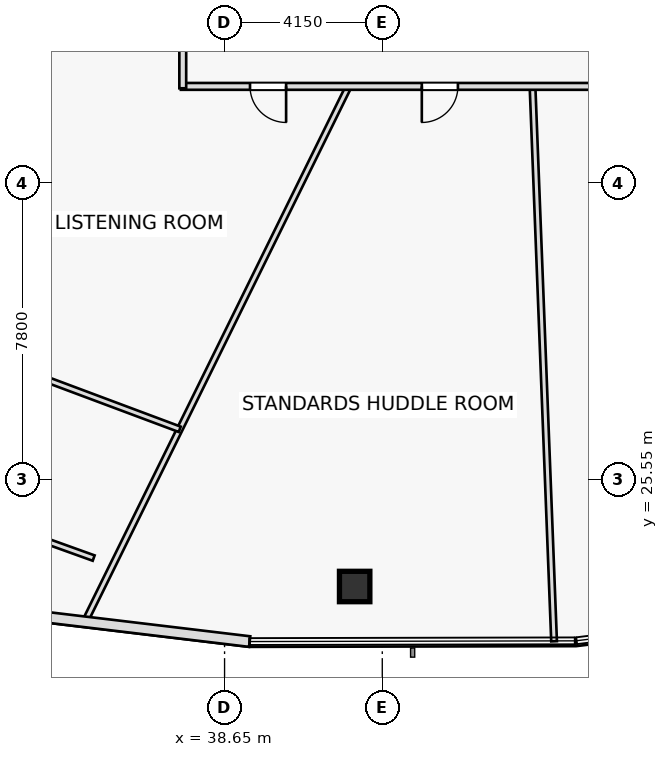
"""IFC4 building model, lengths in metres.
Left out: names, types, materials, properties, quantities, classifications, styles, units other than length and angle.
Written with IfcOpenShell. Run it as: python <this file> out.ifc"""

import sys

from ifc_helpers import new_model, si_unit, direction, frame, frame_2d, origin, origin_2d, place, context, subcontext, project, spatial, rectangle, hollow_rectangle, extrude, element, fill, save


model = new_model("IFC4")
c1 = context("Model", 3, precision=1e-05, world=origin(), true_north=direction((0.0, 1.0)))
c2 = subcontext(c1, "Body", "Model", "MODEL_VIEW")
j1 = project(units=[si_unit("LENGTHUNIT", "METRE"), si_unit("PLANEANGLEUNIT", "RADIAN")], contexts=[c1])
p1 = place(None, origin())
s1 = spatial("IfcSite", under=j1, at=p1, CompositionType="ELEMENT")
p2 = place(p1, origin())
s2 = spatial("IfcBuilding", under=s1, at=p2, CompositionType="ELEMENT")
p3 = place(p2, frame((0.0, 0.0, 39.3)))
s3 = spatial("IfcBuildingStorey", under=s2, at=p3, CompositionType="ELEMENT", Elevation=39.3)
p4 = place(p3, frame((42.073, 22.74, 0.0), z_axis=(0.0, 0.0, 1.0), x_axis=(1.0, 0.0, 0.0)))
e1 = element("IfcColumn", 1, at=p4, inside=s3, PredefinedType="COLUMN", context=c2, shape_type="SweptSolid", body=[
    extrude(hollow_rectangle(XDim=0.8, YDim=0.8, WallThickness=0.045, at=origin_2d()), origin(), (0.0, 0.0, 1.0), 3.6),
])
p5 = place(p3, frame((22.802, 27.945, 0.0), z_axis=(0.0, 0.0, 1.0), x_axis=(0.941102349209, -0.338121824662, 0.0)))
e2 = element("IfcWall", 2, at=p5, inside=s3, PredefinedType="PARTITIONING", context=c2, shape_type="SweptSolid", body=[
    extrude(rectangle(XDim=13.18, YDim=0.15, at=frame_2d((6.59, 0.0))), origin(), (0.0, 0.0, 1.0), 2.925),
])
p6 = place(p3, frame((37.55, 39.238, 0.0), z_axis=(0.0, 0.0, 1.0), x_axis=(-0.838030442993, -0.545623475134, 0.0)))
e3 = element("IfcWall", 3, at=p6, inside=s3, PredefinedType="PARTITIONING", context=c2, shape_type="SweptSolid", body=[
    extrude(rectangle(XDim=22.545, YDim=0.15, at=frame_2d((11.272, 0.0))), origin(), (0.0, 0.0, 1.0), 2.925),
])
p7 = place(p3, frame((41.916, 35.9, 0.0), z_axis=(0.0, 0.0, 1.0), x_axis=(-0.442005604852, -0.897012288255, 0.0)))
e4 = element("IfcWall", 4, at=p7, inside=s3, PredefinedType="PARTITIONING", context=c2, shape_type="SweptSolid", body=[
    extrude(rectangle(XDim=15.718, YDim=0.15, at=frame_2d((7.859, 0.0))), origin(), (0.0, 0.0, 1.0), 2.975),
])
p8 = place(p3, frame((46.753, 35.9, 0.0), z_axis=(0.0, 0.0, 1.0), x_axis=(0.038830968233, -0.999245793539, 0.0)))
e5 = element("IfcWall", 5, at=p8, inside=s3, PredefinedType="PARTITIONING", context=c2, shape_type="SweptSolid", body=[
    extrude(rectangle(XDim=14.612, YDim=0.15, at=frame_2d((7.306, 0.0))), origin(), (0.0, 0.0, 1.0), 2.925),
])
p9 = place(p3, frame((25.458, 31.365, 0.0), z_axis=(0.0, 0.0, 1.0), x_axis=(0.936733084101, -0.350044467391, 0.0)))
e6 = element("IfcWall", 6, at=p9, inside=s3, PredefinedType="PARTITIONING", context=c2, shape_type="SweptSolid", body=[
    extrude(rectangle(XDim=12.823, YDim=0.15, at=frame_2d((6.411, 0.0))), origin(), (0.0, 0.0, 1.0), 2.925),
])
p10 = place(p9, frame((5.936, 0.0, 0.0)))
e7 = element("IfcOpeningElement", 7, at=p10, cuts=e6, PredefinedType="OPENING", context=c2, shape_type="SweptSolid", body=[
    extrude(rectangle(XDim=0.95, YDim=2.05, at=frame_2d((0.475, 1.025))), frame((0.0, 0.085, 0.0), z_axis=(0.0, -1.0, 0.0), x_axis=(1.0, 0.0, 0.0)), (0.0, 0.0, 1.0), 0.17),
])
p11 = place(p3, frame((59.55, 35.9, 0.0), z_axis=(0.0, 0.0, 1.0), x_axis=(-1.0, 0.0, 0.0)))
e8 = element("IfcWall", 8, at=p11, inside=s3, PredefinedType="PARTITIONING", context=c2, shape_type="SweptSolid", body=[
    extrude(rectangle(XDim=22.05, YDim=0.18, at=frame_2d((11.025, 0.0))), origin(), (0.0, 0.0, 1.0), 2.925),
])
p12 = place(p11, frame((2.193, 0.0, 0.0)))
e9 = element("IfcOpeningElement", 9, at=p12, cuts=e8, PredefinedType="OPENING", context=c2, shape_type="SweptSolid", body=[
    extrude(rectangle(XDim=0.95, YDim=2.05, at=frame_2d((0.475, 1.025))), frame((0.0, 0.1, 0.0), z_axis=(0.0, -1.0, 0.0), x_axis=(1.0, 0.0, 0.0)), (0.0, 0.0, 1.0), 0.2),
])
p13 = place(p11, frame((8.49, 0.0, 0.0)))
e10 = element("IfcOpeningElement", 10, at=p13, cuts=e8, PredefinedType="OPENING", context=c2, shape_type="SweptSolid", body=[
    extrude(rectangle(XDim=0.95, YDim=2.05, at=frame_2d((0.475, 1.025))), frame((0.0, 0.1, 0.0), z_axis=(0.0, -1.0, 0.0), x_axis=(1.0, 0.0, 0.0)), (0.0, 0.0, 1.0), 0.2),
])
p14 = place(p11, frame((14.76, 0.0, 0.0)))
e11 = element("IfcOpeningElement", 11, at=p14, cuts=e8, PredefinedType="OPENING", context=c2, shape_type="SweptSolid", body=[
    extrude(rectangle(XDim=0.95, YDim=2.05, at=frame_2d((0.475, 1.025))), frame((0.0, 0.1, 0.0), z_axis=(0.0, -1.0, 0.0), x_axis=(1.0, 0.0, 0.0)), (0.0, 0.0, 1.0), 0.2),
])
p15 = place(p11, frame((19.281, 0.0, 0.0)))
e12 = element("IfcOpeningElement", 12, at=p15, cuts=e8, PredefinedType="OPENING", context=c2, shape_type="SweptSolid", body=[
    extrude(rectangle(XDim=0.95, YDim=2.05, at=frame_2d((0.475, 1.025))), frame((0.0, 0.1, 0.0), z_axis=(0.0, -1.0, 0.0), x_axis=(1.0, 0.0, 0.0)), (0.0, 0.0, 1.0), 0.2),
])
p16 = place(p3, frame((37.55, 35.85, 0.0), z_axis=(0.0, 0.0, 1.0), x_axis=(0.0, 1.0, 0.0)))
e13 = element("IfcWall", 13, at=p16, inside=s3, PredefinedType="PARTITIONING", context=c2, shape_type="SweptSolid", body=[
    extrude(rectangle(XDim=12.65, YDim=0.18, at=frame_2d((6.325, 0.0))), origin(), (0.0, 0.0, 1.0), 2.925),
])
p17 = place(p16, frame((6.159, 0.0, 0.0)))
e14 = element("IfcOpeningElement", 14, at=p17, cuts=e13, PredefinedType="OPENING", context=c2, shape_type="SweptSolid", body=[
    extrude(rectangle(XDim=0.95, YDim=2.05, at=frame_2d((0.475, 1.025))), frame((0.0, 0.1, 0.0), z_axis=(0.0, -1.0, 0.0), x_axis=(1.0, 0.0, 0.0)), (0.0, 0.0, 1.0), 0.2),
])
p18 = place(p3, frame((30.768, 22.314, 0.0), z_axis=(0.0, 0.0, 1.0), x_axis=(0.992909698215, -0.118871069615, 0.0)))
e15 = element("IfcWall", 15, at=p18, inside=s3, PredefinedType="STANDARD", context=c2, shape_type="SweptSolid", body=[
    extrude(rectangle(XDim=8.604, YDim=0.28, at=frame_2d((4.302, 0.0))), origin(), (0.0, 0.0, 1.0), 3.6),
])
p19 = place(p14, origin())
e16 = element("IfcDoor", 16, at=p19, inside=s3, OperationType="SINGLE_SWING_RIGHT", PredefinedType="DOOR", context=c2, shape_type="SweptSolid", body=[
    extrude(rectangle(XDim=0.95, YDim=2.05, at=frame_2d((0.475, 1.025))), frame((0.0, 0.025, 0.0), z_axis=(0.0, -1.0, 0.0), x_axis=(1.0, 0.0, 0.0)), (0.0, 0.0, 1.0), 0.05),
])
fill(e11, e16)
p20 = place(p15, origin())
e17 = element("IfcDoor", 17, at=p20, inside=s3, OperationType="SINGLE_SWING_LEFT", PredefinedType="DOOR", context=c2, shape_type="SweptSolid", body=[
    extrude(rectangle(XDim=0.95, YDim=2.05, at=frame_2d((0.475, 1.025))), frame((0.0, 0.025, 0.0), z_axis=(0.0, -1.0, 0.0), x_axis=(1.0, 0.0, 0.0)), (0.0, 0.0, 1.0), 0.05),
])
fill(e12, e17)
save(model, sys.argv[1])
